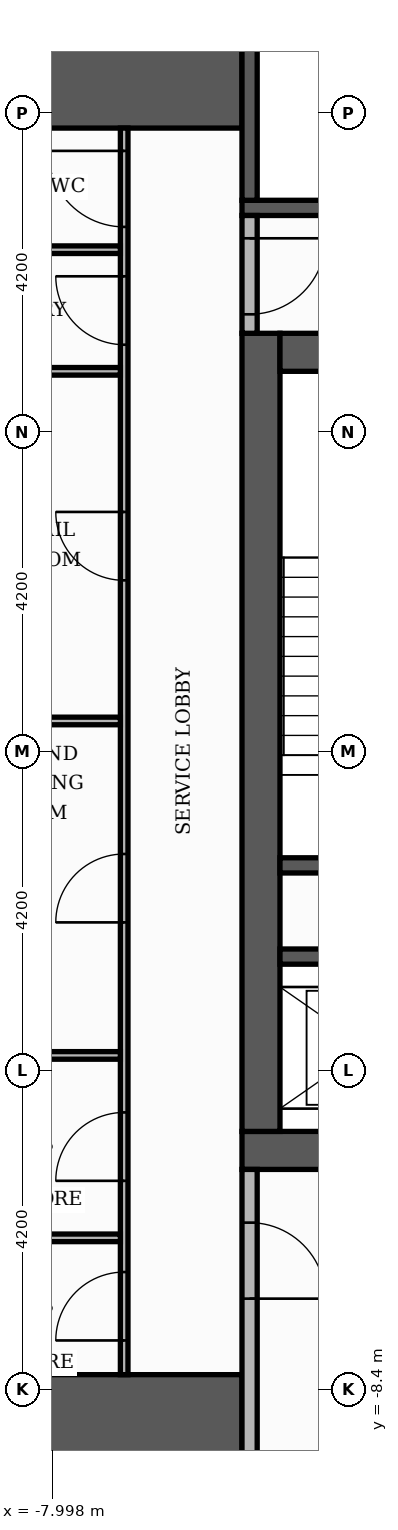
"""IFC4 building model, lengths in metres.
Left out: names, types, materials, properties, quantities, classifications, styles, units other than length and angle.
Written with IfcOpenShell. Run it as: python <this file> out.ifc"""

import sys

from ifc_helpers import new_model, si_unit, direction, frame, frame_2d, origin, place, context, subcontext, project, spatial, rectangle, extrude, element, fill, save


model = new_model("IFC4")
c1 = context("Model", 3, precision=1e-05, world=origin(), true_north=direction((0.0, 1.0)))
c2 = subcontext(c1, "Body", "Model", "MODEL_VIEW")
j1 = project(units=[si_unit("LENGTHUNIT", "METRE"), si_unit("PLANEANGLEUNIT", "RADIAN")], contexts=[c1])
p1 = place(None, origin())
s1 = spatial("IfcSite", under=j1, at=p1, CompositionType="ELEMENT")
p2 = place(p1, origin())
s2 = spatial("IfcBuilding", under=s1, at=p2, CompositionType="ELEMENT")
p3 = place(p2, frame((0.0, 0.0, 283.5)))
s3 = spatial("IfcBuildingStorey", under=s2, at=p3, CompositionType="ELEMENT", Elevation=283.5)
p4 = place(p3, frame((-5.5, -5.25, 0.0), z_axis=(0.0, 0.0, 1.0), x_axis=(1.0, 0.0, 0.0)))
e1 = element("IfcWall", 1, at=p4, inside=s3, PredefinedType="SHEAR", context=c2, shape_type="SweptSolid", body=[
    extrude(rectangle(XDim=11.0, YDim=0.5, at=frame_2d((5.5, 0.0))), origin(), (0.0, 0.0, 1.0), 3.4),
])
p5 = place(p4, frame((4.9, 0.0, 0.0)))
e2 = element("IfcOpeningElement", 2, at=p5, cuts=e1, PredefinedType="OPENING", context=c2, shape_type="SweptSolid", body=[
    extrude(rectangle(XDim=1.2, YDim=2.1, at=frame_2d((0.6, 1.05))), frame((0.0, 0.26, 0.0), z_axis=(0.0, -1.0, 0.0), x_axis=(1.0, 0.0, 0.0)), (0.0, 0.0, 1.0), 0.52),
])
p6 = place(p3, frame((-5.25, -5.0, 0.0), z_axis=(0.0, 0.0, 1.0), x_axis=(0.0, 1.0, 0.0)))
e3 = element("IfcWall", 3, at=p6, inside=s3, PredefinedType="SHEAR", context=c2, shape_type="SweptSolid", body=[
    extrude(rectangle(XDim=10.5, YDim=0.5, at=frame_2d((5.25, 0.0))), origin(), (0.0, 0.0, 1.0), 3.4),
])
p7 = place(p3, frame((-5.0, 5.25, 0.0), z_axis=(0.0, 0.0, 1.0), x_axis=(1.0, 0.0, 0.0)))
e4 = element("IfcWall", 4, at=p7, inside=s3, PredefinedType="SHEAR", context=c2, shape_type="SweptSolid", body=[
    extrude(rectangle(XDim=10.0, YDim=0.5, at=frame_2d((5.0, 0.0))), origin(), (0.0, 0.0, 1.0), 3.4),
])
p8 = place(p7, frame((4.4, 0.0, 0.0)))
e5 = element("IfcOpeningElement", 5, at=p8, cuts=e4, PredefinedType="OPENING", context=c2, shape_type="SweptSolid", body=[
    extrude(rectangle(XDim=1.2, YDim=2.1, at=frame_2d((0.6, 1.05))), frame((0.0, 0.26, 0.0), z_axis=(0.0, -1.0, 0.0), x_axis=(1.0, 0.0, 0.0)), (0.0, 0.0, 1.0), 0.52),
])
for number, where, z_axis, x_axis in (
    (6, (-10.1, -9.15, 0.0), (0.0, 0.0, 1.0), (1.0, 0.0, 0.0)),
    (7, (-10.1, 9.15, 0.0), (0.0, 0.0, 1.0), (1.0, 0.0, 0.0)),
):
    element("IfcWall", number, at=place(p3, frame(where, z_axis=z_axis, x_axis=x_axis)), inside=s3, PredefinedType="SHEAR", context=c2, shape_type="SweptSolid", body=[
        extrude(rectangle(XDim=4.6, YDim=1.9, at=frame_2d((2.3, 0.0))), origin(), (0.0, 0.0, 1.0), 3.4),
    ])
p9 = place(p3, frame((-5.0, -1.5, 0.0), z_axis=(0.0, 0.0, 1.0), x_axis=(1.0, 0.0, 0.0)))
e8 = element("IfcWall", 8, at=p9, inside=s3, PredefinedType="SHEAR", context=c2, shape_type="SweptSolid", body=[
    extrude(rectangle(XDim=3.05, YDim=0.2, at=frame_2d((1.525, 0.0))), origin(), (0.0, 0.0, 1.0), 3.4),
])
p10 = place(p3, frame((-5.5, 7.15, 0.0), z_axis=(0.0, 0.0, 1.0), x_axis=(1.0, 0.0, 0.0)))
e9 = element("IfcWall", 9, at=p10, inside=s3, PredefinedType="SHEAR", context=c2, shape_type="SweptSolid", body=[
    extrude(rectangle(XDim=6.8, YDim=0.2, at=frame_2d((3.4, 0.0))), origin(), (0.0, 0.0, 1.0), 3.4),
])
for number, where, z_axis, x_axis in (
    (10, (-5.4, 7.25, 0.0), (0.0, 0.0, 1.0), (0.0, 1.0, 0.0)),
    (11, (-5.0, -2.7, 0.0), (0.0, 0.0, 1.0), (1.0, 0.0, 0.0)),
):
    element("IfcWall", number, at=place(p3, frame(where, z_axis=z_axis, x_axis=x_axis)), inside=s3, PredefinedType="SHEAR", context=c2, shape_type="SweptSolid", body=[
        extrude(rectangle(XDim=2.85, YDim=0.2, at=frame_2d((1.425, 0.0))), origin(), (0.0, 0.0, 1.0), 3.4),
    ])
p11 = place(p3, frame((-5.4, -10.1, 0.0), z_axis=(0.0, 0.0, 1.0), x_axis=(0.0, 1.0, 0.0)))
e12 = element("IfcWall", 12, at=p11, inside=s3, PredefinedType="PARTITIONING", context=c2, shape_type="SweptSolid", body=[
    extrude(rectangle(XDim=4.6, YDim=0.2, at=frame_2d((2.3, 0.0))), origin(), (0.0, 0.0, 1.0), 3.4),
])
p12 = place(p11, frame((2.9, 0.0, 0.0)))
e13 = element("IfcOpeningElement", 13, at=p12, cuts=e12, PredefinedType="OPENING", context=c2, shape_type="SweptSolid", body=[
    extrude(rectangle(XDim=1.0, YDim=2.1, at=frame_2d((0.5, 1.05))), frame((0.0, 0.11, 0.0), z_axis=(0.0, -1.0, 0.0), x_axis=(1.0, 0.0, 0.0)), (0.0, 0.0, 1.0), 0.22),
])
p13 = place(p3, frame((-7.05, -8.2, 0.0), z_axis=(0.0, 0.0, 1.0), x_axis=(0.0, 1.0, 0.0)))
e14 = element("IfcWall", 14, at=p13, inside=s3, PredefinedType="PARTITIONING", context=c2, shape_type="SweptSolid", body=[
    extrude(rectangle(XDim=16.4, YDim=0.1, at=frame_2d((8.2, 0.0))), origin(), (0.0, 0.0, 1.0), 3.4),
])
p14 = place(p13, frame((0.45, 0.0, 0.0)))
e15 = element("IfcOpeningElement", 15, at=p14, cuts=e14, PredefinedType="OPENING", context=c2, shape_type="SweptSolid", body=[
    extrude(rectangle(XDim=0.9, YDim=2.1, at=frame_2d((0.45, 1.05))), frame((0.0, 0.06, 0.0), z_axis=(0.0, -1.0, 0.0), x_axis=(1.0, 0.0, 0.0)), (0.0, 0.0, 1.0), 0.12),
])
p15 = place(p13, frame((2.55, 0.0, 0.0)))
e16 = element("IfcOpeningElement", 16, at=p15, cuts=e14, PredefinedType="OPENING", context=c2, shape_type="SweptSolid", body=[
    extrude(rectangle(XDim=0.9, YDim=2.1, at=frame_2d((0.45, 1.05))), frame((0.0, 0.06, 0.0), z_axis=(0.0, -1.0, 0.0), x_axis=(1.0, 0.0, 0.0)), (0.0, 0.0, 1.0), 0.12),
])
p16 = place(p13, frame((5.95, 0.0, 0.0)))
e17 = element("IfcOpeningElement", 17, at=p16, cuts=e14, PredefinedType="OPENING", context=c2, shape_type="SweptSolid", body=[
    extrude(rectangle(XDim=0.9, YDim=2.1, at=frame_2d((0.45, 1.05))), frame((0.0, 0.06, 0.0), z_axis=(0.0, -1.0, 0.0), x_axis=(1.0, 0.0, 0.0)), (0.0, 0.0, 1.0), 0.12),
])
p17 = place(p13, frame((10.45, 0.0, 0.0)))
e18 = element("IfcOpeningElement", 18, at=p17, cuts=e14, PredefinedType="OPENING", context=c2, shape_type="SweptSolid", body=[
    extrude(rectangle(XDim=0.9, YDim=2.1, at=frame_2d((0.45, 1.05))), frame((0.0, 0.06, 0.0), z_axis=(0.0, -1.0, 0.0), x_axis=(1.0, 0.0, 0.0)), (0.0, 0.0, 1.0), 0.12),
])
p18 = place(p13, frame((13.55, 0.0, 0.0)))
e19 = element("IfcOpeningElement", 19, at=p18, cuts=e14, PredefinedType="OPENING", context=c2, shape_type="SweptSolid", body=[
    extrude(rectangle(XDim=0.9, YDim=2.1, at=frame_2d((0.45, 1.05))), frame((0.0, 0.06, 0.0), z_axis=(0.0, -1.0, 0.0), x_axis=(1.0, 0.0, 0.0)), (0.0, 0.0, 1.0), 0.12),
])
p19 = place(p13, frame((15.1, 0.0, 0.0)))
e20 = element("IfcOpeningElement", 20, at=p19, cuts=e14, PredefinedType="OPENING", context=c2, shape_type="SweptSolid", body=[
    extrude(rectangle(XDim=1.0, YDim=2.1, at=frame_2d((0.5, 1.05))), frame((0.0, 0.06, 0.0), z_axis=(0.0, -1.0, 0.0), x_axis=(1.0, 0.0, 0.0)), (0.0, 0.0, 1.0), 0.12),
])
for number, where, z_axis, x_axis in (
    (21, (-9.0, -6.4, 0.0), (0.0, 0.0, 1.0), (1.0, 0.0, 0.0)),
    (22, (-9.0, -4.0, 0.0), (0.0, 0.0, 1.0), (1.0, 0.0, 0.0)),
    (23, (-9.0, 0.4, 0.0), (0.0, 0.0, 1.0), (1.0, 0.0, 0.0)),
    (24, (-9.0, 5.0, 0.0), (0.0, 0.0, 1.0), (1.0, 0.0, 0.0)),
):
    element("IfcWall", number, at=place(p3, frame(where, z_axis=z_axis, x_axis=x_axis)), inside=s3, PredefinedType="PARTITIONING", context=c2, shape_type="SweptSolid", body=[
        extrude(rectangle(XDim=1.9, YDim=0.1, at=frame_2d((0.95, 0.0))), origin(), (0.0, 0.0, 1.0), 3.4),
    ])
p20 = place(p3, frame((-5.4, 5.5, 0.0), z_axis=(0.0, 0.0, 1.0), x_axis=(0.0, 1.0, 0.0)))
e25 = element("IfcWall", 25, at=p20, inside=s3, PredefinedType="PARTITIONING", context=c2, shape_type="SweptSolid", body=[
    extrude(rectangle(XDim=1.55, YDim=0.2, at=frame_2d((0.775, 0.0))), origin(), (0.0, 0.0, 1.0), 3.4),
])
p21 = place(p20, frame((0.25, 0.0, 0.0)))
e26 = element("IfcOpeningElement", 26, at=p21, cuts=e25, PredefinedType="OPENING", context=c2, shape_type="SweptSolid", body=[
    extrude(rectangle(XDim=1.0, YDim=2.1, at=frame_2d((0.5, 1.05))), frame((0.0, 0.11, 0.0), z_axis=(0.0, -1.0, 0.0), x_axis=(1.0, 0.0, 0.0)), (0.0, 0.0, 1.0), 0.22),
])
p22 = place(p3, frame((-9.0, 6.6, 0.0), z_axis=(0.0, 0.0, 1.0), x_axis=(1.0, 0.0, 0.0)))
e27 = element("IfcWall", 27, at=p22, inside=s3, PredefinedType="PARTITIONING", context=c2, shape_type="SweptSolid", body=[
    extrude(rectangle(XDim=1.9, YDim=0.1, at=frame_2d((0.95, 0.0))), origin(), (0.0, 0.0, 1.0), 3.4),
])
p23 = place(p21, frame((1.0, 0.0, 0.0), z_axis=(0.0, 0.0, 1.0), x_axis=(-1.0, 0.0, 0.0)))
e28 = element("IfcDoor", 28, at=p23, inside=s3, OperationType="SINGLE_SWING_RIGHT", PredefinedType="DOOR", context=c2, shape_type="SweptSolid", body=[
    extrude(rectangle(XDim=1.0, YDim=2.1, at=frame_2d((0.5, 1.05))), frame((0.0, 0.025, 0.0), z_axis=(0.0, -1.0, 0.0), x_axis=(1.0, 0.0, 0.0)), (0.0, 0.0, 1.0), 0.05),
])
fill(e26, e28)
p24 = place(p12, frame((1.0, 0.0, 0.0), z_axis=(0.0, 0.0, 1.0), x_axis=(-1.0, 0.0, 0.0)))
e29 = element("IfcDoor", 29, at=p24, inside=s3, OperationType="SINGLE_SWING_LEFT", PredefinedType="DOOR", context=c2, shape_type="SweptSolid", body=[
    extrude(rectangle(XDim=1.0, YDim=2.1, at=frame_2d((0.5, 1.05))), frame((0.0, 0.025, 0.0), z_axis=(0.0, -1.0, 0.0), x_axis=(1.0, 0.0, 0.0)), (0.0, 0.0, 1.0), 0.05),
])
fill(e13, e29)
p25 = place(p14, origin())
e30 = element("IfcDoor", 30, at=p25, inside=s3, OperationType="SINGLE_SWING_LEFT", PredefinedType="DOOR", context=c2, shape_type="SweptSolid", body=[
    extrude(rectangle(XDim=0.9, YDim=2.1, at=frame_2d((0.45, 1.05))), frame((0.0, 0.025, 0.0), z_axis=(0.0, -1.0, 0.0), x_axis=(1.0, 0.0, 0.0)), (0.0, 0.0, 1.0), 0.05),
])
fill(e15, e30)
p26 = place(p15, origin())
e31 = element("IfcDoor", 31, at=p26, inside=s3, OperationType="SINGLE_SWING_LEFT", PredefinedType="DOOR", context=c2, shape_type="SweptSolid", body=[
    extrude(rectangle(XDim=0.9, YDim=2.1, at=frame_2d((0.45, 1.05))), frame((0.0, 0.025, 0.0), z_axis=(0.0, -1.0, 0.0), x_axis=(1.0, 0.0, 0.0)), (0.0, 0.0, 1.0), 0.05),
])
fill(e16, e31)
p27 = place(p16, origin())
e32 = element("IfcDoor", 32, at=p27, inside=s3, OperationType="SINGLE_SWING_LEFT", PredefinedType="DOOR", context=c2, shape_type="SweptSolid", body=[
    extrude(rectangle(XDim=0.9, YDim=2.1, at=frame_2d((0.45, 1.05))), frame((0.0, 0.025, 0.0), z_axis=(0.0, -1.0, 0.0), x_axis=(1.0, 0.0, 0.0)), (0.0, 0.0, 1.0), 0.05),
])
fill(e17, e32)
p28 = place(p17, origin())
e33 = element("IfcDoor", 33, at=p28, inside=s3, OperationType="SINGLE_SWING_RIGHT", PredefinedType="DOOR", context=c2, shape_type="SweptSolid", body=[
    extrude(rectangle(XDim=0.9, YDim=2.1, at=frame_2d((0.45, 1.05))), frame((0.0, 0.025, 0.0), z_axis=(0.0, -1.0, 0.0), x_axis=(1.0, 0.0, 0.0)), (0.0, 0.0, 1.0), 0.05),
])
fill(e18, e33)
p29 = place(p18, origin())
e34 = element("IfcDoor", 34, at=p29, inside=s3, OperationType="SINGLE_SWING_RIGHT", PredefinedType="DOOR", context=c2, shape_type="SweptSolid", body=[
    extrude(rectangle(XDim=0.9, YDim=2.1, at=frame_2d((0.45, 1.05))), frame((0.0, 0.025, 0.0), z_axis=(0.0, -1.0, 0.0), x_axis=(1.0, 0.0, 0.0)), (0.0, 0.0, 1.0), 0.05),
])
fill(e19, e34)
p30 = place(p19, origin())
e35 = element("IfcDoor", 35, at=p30, inside=s3, OperationType="SINGLE_SWING_RIGHT", PredefinedType="DOOR", context=c2, shape_type="SweptSolid", body=[
    extrude(rectangle(XDim=1.0, YDim=2.1, at=frame_2d((0.5, 1.05))), frame((0.0, 0.025, 0.0), z_axis=(0.0, -1.0, 0.0), x_axis=(1.0, 0.0, 0.0)), (0.0, 0.0, 1.0), 0.05),
])
fill(e20, e35)
save(model, sys.argv[1])
